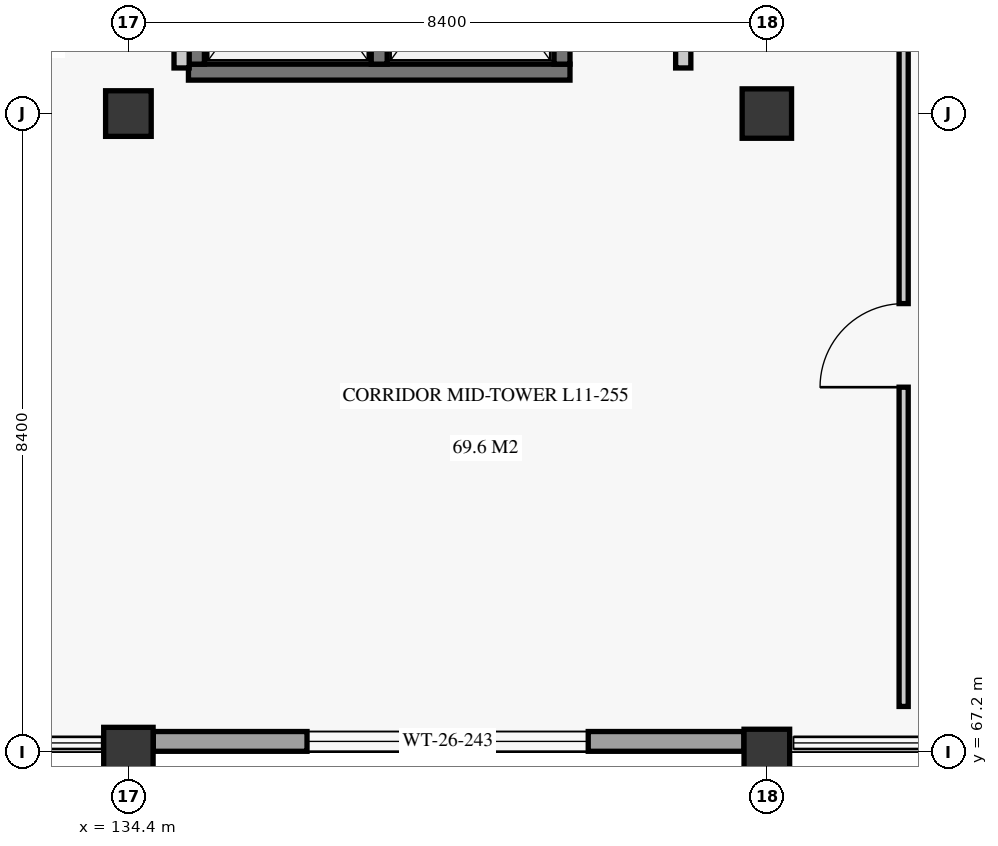
"""IFC4 building model, lengths in metres.
Left out: names, types, materials, properties, quantities, classifications, styles, units other than length and angle.
Written with IfcOpenShell. Run it as: python <this file> out.ifc"""

import sys

from ifc_helpers import new_model, si_unit, direction, frame, frame_2d, origin, origin_2d, place, context, subcontext, project, spatial, rectangle, extrude, element, fill, save


model = new_model("IFC4")
c1 = context("Model", 3, precision=1e-05, world=origin(), true_north=direction((0.0, 1.0)))
c2 = subcontext(c1, "Body", "Model", "MODEL_VIEW")
j1 = project(units=[si_unit("LENGTHUNIT", "METRE"), si_unit("PLANEANGLEUNIT", "RADIAN")], contexts=[c1])
p1 = place(None, origin())
s1 = spatial("IfcSite", under=j1, at=p1, CompositionType="ELEMENT")
p2 = place(p1, origin())
s2 = spatial("IfcBuilding", under=s1, at=p2, CompositionType="ELEMENT")
p3 = place(p2, frame((0.0, 0.0, 46.7)))
s3 = spatial("IfcBuildingStorey", under=s2, at=p3, CompositionType="ELEMENT", Elevation=46.7)
p4 = place(p3, frame((134.4, 67.2, 0.0), z_axis=(0.0, 0.0, 1.0), x_axis=(1.0, 0.0, 0.0)))
e1 = element("IfcColumn", 1, at=p4, inside=s3, PredefinedType="COLUMN", context=c2, shape_type="SweptSolid", body=[
    extrude(rectangle(XDim=0.65, YDim=0.65, at=origin_2d()), origin(), (0.0, 0.0, 1.0), 3.72),
])
for number, where, z_axis, x_axis in (
    (2, (134.4, 75.6, 0.0), (0.0, 0.0, 1.0), (1.0, 0.0, 0.0)),
    (3, (142.8, 67.2, 0.0), (0.0, 0.0, 1.0), (1.0, 0.0, 0.0)),
):
    element("IfcColumn", number, at=place(p3, frame(where, z_axis=z_axis, x_axis=x_axis)), inside=s3, PredefinedType="COLUMN", context=c2, shape_type="SweptSolid", body=[
        extrude(rectangle(XDim=0.6, YDim=0.6, at=origin_2d()), origin(), (0.0, 0.0, 1.0), 3.72),
    ])
p5 = place(p3, frame((142.8, 75.6, 0.0), z_axis=(0.0, 0.0, 1.0), x_axis=(1.0, 0.0, 0.0)))
e4 = element("IfcColumn", 4, at=p5, inside=s3, PredefinedType="COLUMN", context=c2, shape_type="SweptSolid", body=[
    extrude(rectangle(XDim=0.65, YDim=0.65, at=origin_2d()), origin(), (0.0, 0.0, 1.0), 3.72),
])
p6 = place(p3, frame((134.728, 67.34, 0.0), z_axis=(0.0, 0.0, 1.0), x_axis=(1.0, 0.0, 0.0)))
e5 = element("IfcWall", 5, at=p6, inside=s3, PredefinedType="SOLIDWALL", context=c2, shape_type="SweptSolid", body=[
    extrude(rectangle(XDim=7.77, YDim=0.26, at=frame_2d((3.885, 0.0))), origin(), (0.0, 0.0, 1.0), 3.04),
])
p7 = place(p6, frame((2.022, 0.0, 0.85)))
e6 = element("IfcOpeningElement", 6, at=p7, cuts=e5, PredefinedType="OPENING", context=c2, shape_type="SweptSolid", body=[
    extrude(rectangle(XDim=3.7, YDim=1.9, at=frame_2d((1.85, 0.95))), frame((0.0, 0.14, 0.0), z_axis=(0.0, -1.0, 0.0), x_axis=(1.0, 0.0, 0.0)), (0.0, 0.0, 1.0), 0.28),
])
p8 = place(p3, frame((135.19, 76.145, 0.0), z_axis=(0.0, 0.0, 1.0), x_axis=(1.0, 0.0, 0.0)))
e7 = element("IfcWall", 7, at=p8, inside=s3, PredefinedType="SHEAR", context=c2, shape_type="SweptSolid", body=[
    extrude(rectangle(XDim=5.02, YDim=0.21, at=frame_2d((2.51, 0.0))), origin(), (0.0, 0.0, 1.0), 3.72),
])
for number, where, z_axis, x_axis in (
    (8, (135.295, 76.25, 0.0), (0.0, 0.0, 1.0), (0.0, 1.0, 0.0)),
    (9, (140.105, 76.25, 0.0), (0.0, 0.0, 1.0), (0.0, 1.0, 0.0)),
    (10, (137.7, 76.25, 0.0), (0.0, 0.0, 1.0), (0.0, 1.0, 0.0)),
):
    element("IfcWall", number, at=place(p3, frame(where, z_axis=z_axis, x_axis=x_axis)), inside=s3, PredefinedType="SHEAR", context=c2, shape_type="SweptSolid", body=[
        extrude(rectangle(XDim=3.0, YDim=0.21, at=frame_2d((1.5, 0.0))), origin(), (0.0, 0.0, 1.0), 3.72),
    ])
for number, where, z_axis, x_axis in (
    (11, (135.1, 76.2, 0.0), (0.0, 0.0, 1.0), (0.0, 1.0, 0.0)),
    (12, (141.7, 76.2, 0.0), (0.0, 0.0, 1.0), (0.0, 1.0, 0.0)),
):
    element("IfcWall", number, at=place(p3, frame(where, z_axis=z_axis, x_axis=x_axis)), inside=s3, PredefinedType="PARTITIONING", context=c2, shape_type="SweptSolid", body=[
        extrude(rectangle(XDim=7.25, YDim=0.2, at=frame_2d((3.625, 0.0))), origin(), (0.0, 0.0, 1.0), 3.34),
    ])
p9 = place(p3, frame((144.6, 67.8, 0.0), z_axis=(0.0, 0.0, 1.0), x_axis=(0.0, 1.0, 0.0)))
e13 = element("IfcWall", 13, at=p9, inside=s3, PredefinedType="PARTITIONING", context=c2, shape_type="SweptSolid", body=[
    extrude(rectangle(XDim=32.4, YDim=0.12, at=frame_2d((16.2, 0.0))), origin(), (0.0, 0.0, 1.0), 3.34),
])
p10 = place(p9, frame((4.2, 0.0, 0.0)))
e14 = element("IfcOpeningElement", 14, at=p10, cuts=e13, PredefinedType="OPENING", context=c2, shape_type="SweptSolid", body=[
    extrude(rectangle(XDim=1.1, YDim=2.15, at=frame_2d((0.55, 1.075))), frame((0.0, 0.07, 0.0), z_axis=(0.0, -1.0, 0.0), x_axis=(1.0, 0.0, 0.0)), (0.0, 0.0, 1.0), 0.14),
])
p11 = place(p9, frame((26.4, 0.0, 0.0)))
e15 = element("IfcOpeningElement", 15, at=p11, cuts=e13, PredefinedType="OPENING", context=c2, shape_type="SweptSolid", body=[
    extrude(rectangle(XDim=1.2, YDim=2.3, at=frame_2d((0.6, 1.15))), frame((0.0, 0.07, 0.0), z_axis=(0.0, -1.0, 0.0), x_axis=(1.0, 0.0, 0.0)), (0.0, 0.0, 1.0), 0.14),
])
p12 = place(p7, origin())
e16 = element("IfcWindow", 16, at=p12, inside=s3, PartitioningType="SINGLE_PANEL", PredefinedType="WINDOW", context=c2, shape_type="SweptSolid", body=[
    extrude(rectangle(XDim=3.7, YDim=1.9, at=frame_2d((1.85, 0.95))), frame((0.0, 0.03, 0.0), z_axis=(0.0, -1.0, 0.0), x_axis=(1.0, 0.0, 0.0)), (0.0, 0.0, 1.0), 0.06),
])
fill(e6, e16)
p13 = place(p10, origin())
e17 = element("IfcDoor", 17, at=p13, inside=s3, OperationType="SINGLE_SWING_LEFT", PredefinedType="DOOR", context=c2, shape_type="SweptSolid", body=[
    extrude(rectangle(XDim=1.1, YDim=2.15, at=frame_2d((0.55, 1.075))), frame((0.0, 0.025, 0.0), z_axis=(0.0, -1.0, 0.0), x_axis=(1.0, 0.0, 0.0)), (0.0, 0.0, 1.0), 0.05),
])
fill(e14, e17)
save(model, sys.argv[1])
